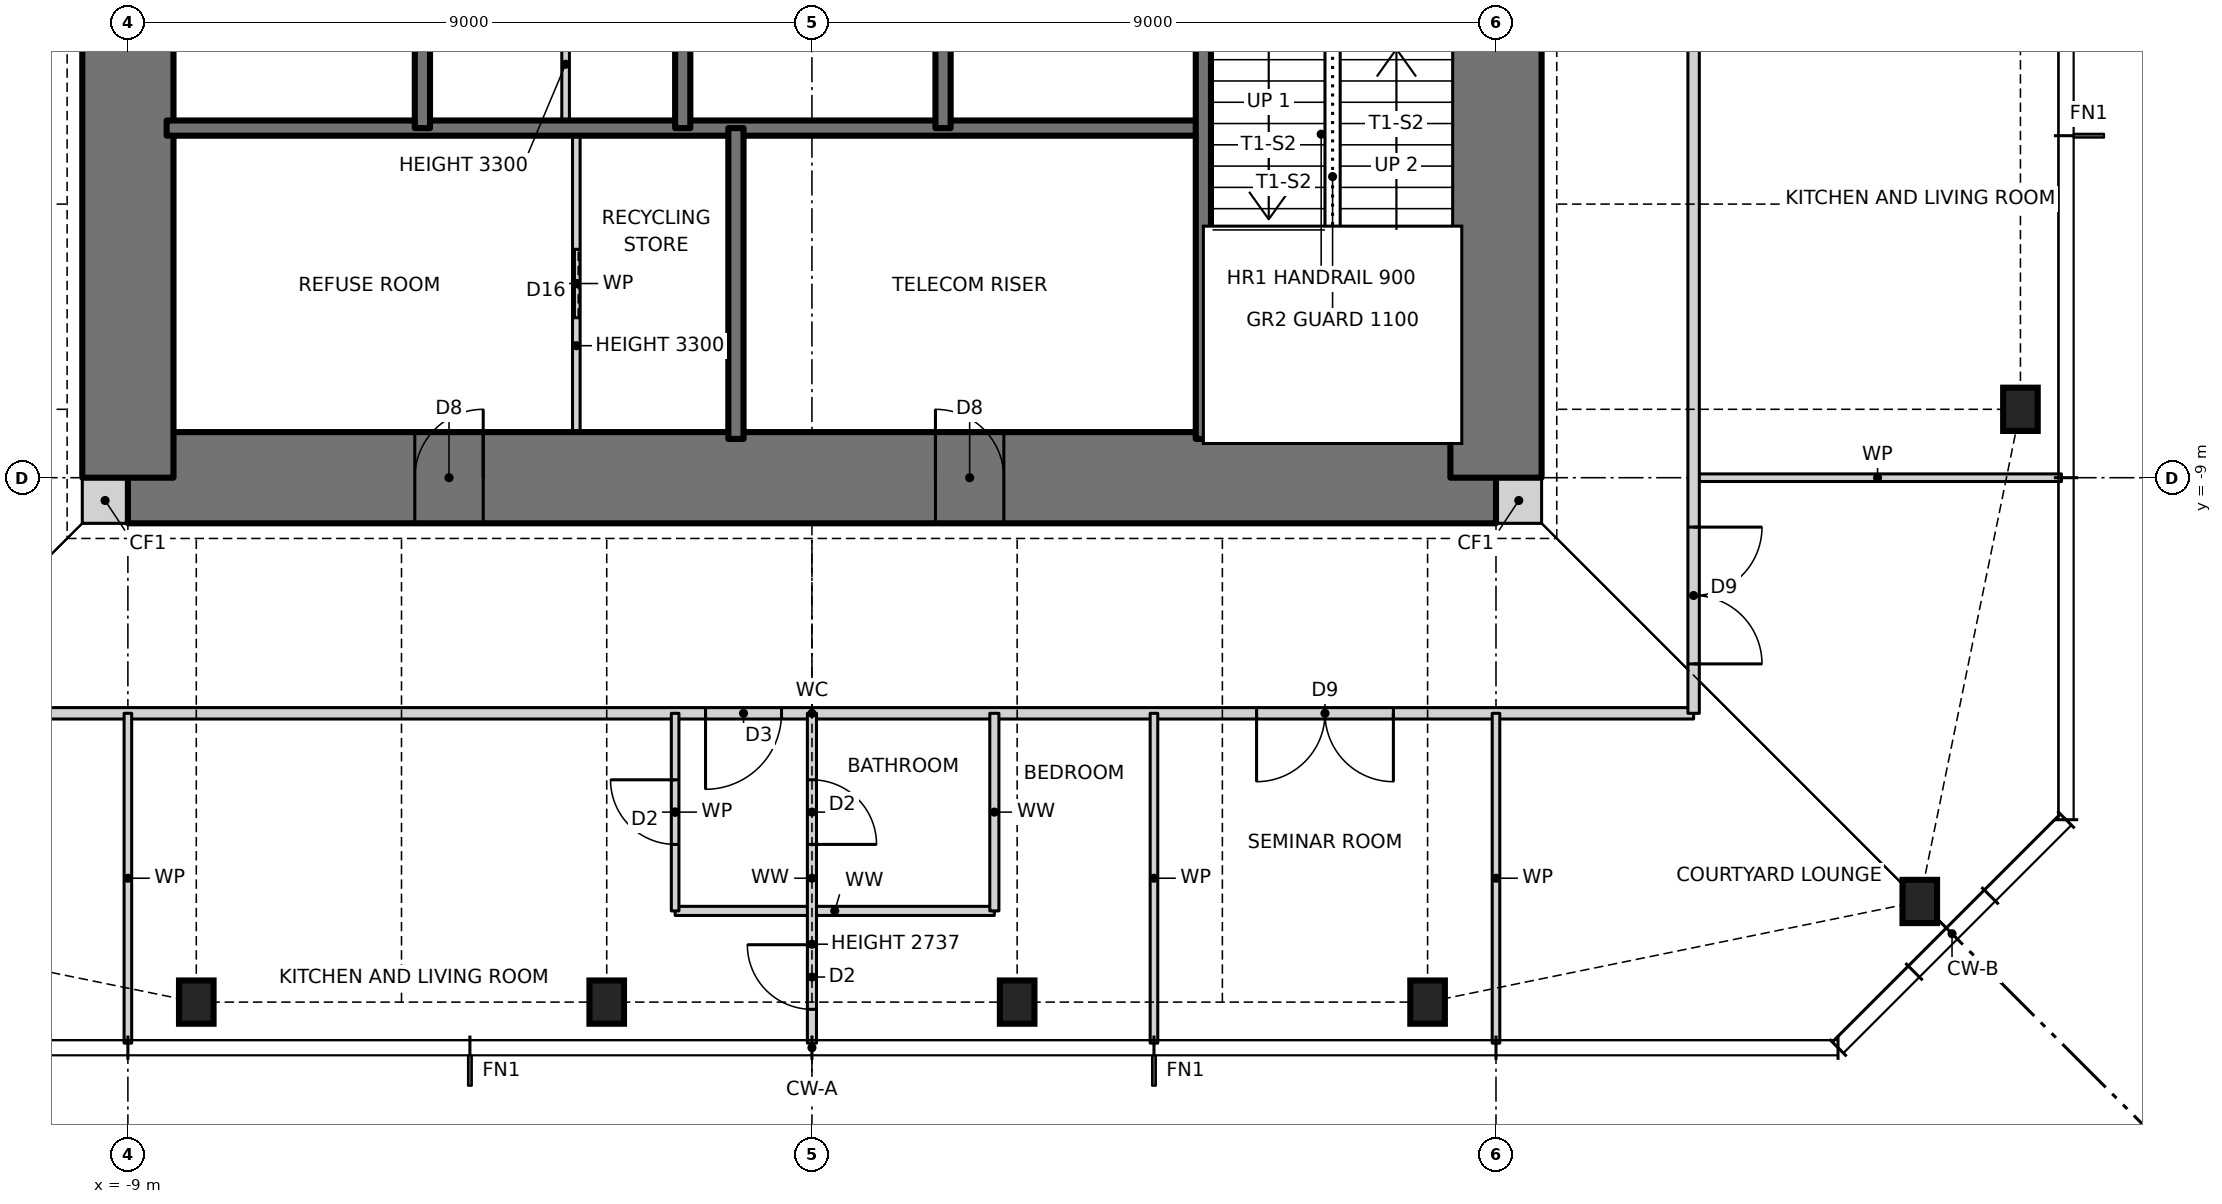
"""IFC4 building model, lengths in metres.
Left out: names, types, materials, properties, quantities, classifications, styles, units other than length and angle.
Written with IfcOpenShell. Run it as: python <this file> out.ifc"""

import sys

from ifc_helpers import new_model, si_unit, direction, frame, frame_2d, origin, origin_2d, place, context, subcontext, project, spatial, rectangle, i_section, extrude, element, fill, save


model = new_model("IFC4")
c1 = context("Model", 3, precision=1e-05, world=origin(), true_north=direction((0.0, 1.0)))
c2 = subcontext(c1, "Body", "Model", "MODEL_VIEW")
j1 = project(units=[si_unit("LENGTHUNIT", "METRE"), si_unit("PLANEANGLEUNIT", "RADIAN")], contexts=[c1])
p1 = place(None, origin())
s1 = spatial("IfcSite", under=j1, at=p1, CompositionType="ELEMENT")
p2 = place(p1, origin())
s2 = spatial("IfcBuilding", under=s1, at=p2, CompositionType="ELEMENT")
p3 = place(p2, frame((0.0, 0.0, 229.0)))
s3 = spatial("IfcBuildingStorey", under=s2, at=p3, CompositionType="ELEMENT", Elevation=229.0)
for number, where, z_axis, x_axis in (
    (1, (-8.1, -15.9, 0.0), (0.0, 0.0, 1.0), (1.0, 0.0, 0.0)),
    (2, (-2.7, -15.9, 0.0), (0.0, 0.0, 1.0), (1.0, 0.0, 0.0)),
    (3, (2.7, -15.9, 0.0), (0.0, 0.0, 1.0), (1.0, 0.0, 0.0)),
    (4, (8.1, -15.9, 0.0), (0.0, 0.0, 1.0), (1.0, 0.0, 0.0)),
    (5, (14.576, -14.576, 0.0), (0.0, 0.0, 1.0), (1.0, 0.0, 0.0)),
    (6, (15.9, -8.1, 0.0), (0.0, 0.0, 1.0), (1.0, 0.0, 0.0)),
):
    element("IfcColumn", number, at=place(p3, frame(where, z_axis=z_axis, x_axis=x_axis)), inside=s3, PredefinedType="COLUMN", context=c2, shape_type="SweptSolid", body=[
        extrude(i_section(OverallWidth=0.455, OverallDepth=0.569, WebThickness=0.078, FlangeThickness=0.125, at=origin_2d()), origin(), (0.0, 0.0, 1.0), 3.5),
    ])
for number, where, z_axis, x_axis in (
    (7, (-9.6, -9.3, 0.0), (0.0, 0.0, 1.0), (1.0, 0.0, 0.0)),
    (8, (9.0, -9.3, 0.0), (0.0, 0.0, 1.0), (1.0, 0.0, 0.0)),
):
    element("IfcWall", number, at=place(p3, frame(where, z_axis=z_axis, x_axis=x_axis)), inside=s3, PredefinedType="SOLIDWALL", context=c2, shape_type="SweptSolid", body=[
        extrude(rectangle(XDim=0.6, YDim=0.6, at=frame_2d((0.3, 0.0))), origin(), (0.0, 0.0, 1.0), 3.5),
    ])
p4 = place(p3, frame((-9.0, -9.0, 0.0), z_axis=(0.0, 0.0, 1.0), x_axis=(1.0, 0.0, 0.0)))
e9 = element("IfcWall", 9, at=p4, inside=s3, PredefinedType="SHEAR", context=c2, shape_type="SweptSolid", body=[
    extrude(rectangle(XDim=18.0, YDim=1.2, at=frame_2d((9.0, 0.0))), origin(), (0.0, 0.0, 1.0), 3.5),
])
p5 = place(p4, frame((3.775, 0.0, 0.0)))
e10 = element("IfcOpeningElement", 10, at=p5, cuts=e9, PredefinedType="OPENING", context=c2, shape_type="SweptSolid", body=[
    extrude(rectangle(XDim=0.9, YDim=2.1, at=frame_2d((0.45, 1.05))), frame((0.0, 0.61, 0.0), z_axis=(0.0, -1.0, 0.0), x_axis=(1.0, 0.0, 0.0)), (0.0, 0.0, 1.0), 1.22),
])
p6 = place(p4, frame((10.625, 0.0, 0.0)))
e11 = element("IfcOpeningElement", 11, at=p6, cuts=e9, PredefinedType="OPENING", context=c2, shape_type="SweptSolid", body=[
    extrude(rectangle(XDim=0.9, YDim=2.1, at=frame_2d((0.45, 1.05))), frame((0.0, 0.61, 0.0), z_axis=(0.0, -1.0, 0.0), x_axis=(1.0, 0.0, 0.0)), (0.0, 0.0, 1.0), 1.22),
])
p7 = place(p3, frame((9.0, -9.0, 0.0), z_axis=(0.0, 0.0, 1.0), x_axis=(0.0, 1.0, 0.0)))
e12 = element("IfcWall", 12, at=p7, inside=s3, PredefinedType="SHEAR", context=c2, shape_type="SweptSolid", body=[
    extrude(rectangle(XDim=18.0, YDim=1.2, at=frame_2d((9.0, 0.0))), origin(), (0.0, 0.0, 1.0), 3.5),
])
p8 = place(p7, frame((8.5, 0.0, 0.0)))
e13 = element("IfcOpeningElement", 13, at=p8, cuts=e12, PredefinedType="OPENING", context=c2, shape_type="SweptSolid", body=[
    extrude(rectangle(XDim=1.0, YDim=2.1, at=frame_2d((0.5, 1.05))), frame((0.0, 0.61, 0.0), z_axis=(0.0, -1.0, 0.0), x_axis=(1.0, 0.0, 0.0)), (0.0, 0.0, 1.0), 1.22),
])
p9 = place(p3, frame((-9.0, 9.0, 0.0), z_axis=(0.0, 0.0, 1.0), x_axis=(0.0, -1.0, 0.0)))
e14 = element("IfcWall", 14, at=p9, inside=s3, PredefinedType="SHEAR", context=c2, shape_type="SweptSolid", body=[
    extrude(rectangle(XDim=18.0, YDim=1.2, at=frame_2d((9.0, 0.0))), origin(), (0.0, 0.0, 1.0), 3.5),
])
p10 = place(p9, frame((8.5, 0.0, 0.0)))
e15 = element("IfcOpeningElement", 15, at=p10, cuts=e14, PredefinedType="OPENING", context=c2, shape_type="SweptSolid", body=[
    extrude(rectangle(XDim=1.0, YDim=2.1, at=frame_2d((0.5, 1.05))), frame((0.0, 0.61, 0.0), z_axis=(0.0, -1.0, 0.0), x_axis=(1.0, 0.0, 0.0)), (0.0, 0.0, 1.0), 1.22),
])
p11 = place(p3, frame((-1.8, -14.7, 0.0), z_axis=(0.0, 0.0, 1.0), x_axis=(1.0, 0.0, 0.0)))
e16 = element("IfcWall", 16, at=p11, inside=s3, PredefinedType="PARTITIONING", context=c2, shape_type="SweptSolid", body=[
    extrude(rectangle(XDim=4.2, YDim=0.12, at=frame_2d((2.1, 0.0))), origin(), (0.0, 0.0, 1.0), 3.27),
])
p12 = place(p3, frame((-11.6, -12.1, 0.0), z_axis=(0.0, 0.0, 1.0), x_axis=(1.0, 0.0, 0.0)))
e17 = element("IfcWall", 17, at=p12, inside=s3, PredefinedType="PARTITIONING", context=c2, shape_type="SweptSolid", body=[
    extrude(rectangle(XDim=23.2, YDim=0.15, at=frame_2d((11.6, 0.0))), origin(), (0.0, 0.0, 1.0), 3.27),
])
p13 = place(p12, frame((10.2, 0.0, 0.0)))
e18 = element("IfcOpeningElement", 18, at=p13, cuts=e17, PredefinedType="OPENING", context=c2, shape_type="SweptSolid", body=[
    extrude(rectangle(XDim=1.0, YDim=2.1, at=frame_2d((0.5, 1.05))), frame((0.0, 0.085, 0.0), z_axis=(0.0, -1.0, 0.0), x_axis=(1.0, 0.0, 0.0)), (0.0, 0.0, 1.0), 0.17),
])
p14 = place(p12, frame((17.45, 0.0, 0.0)))
e19 = element("IfcOpeningElement", 19, at=p14, cuts=e17, PredefinedType="OPENING", context=c2, shape_type="SweptSolid", body=[
    extrude(rectangle(XDim=1.8, YDim=2.1, at=frame_2d((0.9, 1.05))), frame((0.0, 0.085, 0.0), z_axis=(0.0, -1.0, 0.0), x_axis=(1.0, 0.0, 0.0)), (0.0, 0.0, 1.0), 0.17),
])
p15 = place(p3, frame((11.6, -9.0, 0.0), z_axis=(0.0, 0.0, 1.0), x_axis=(1.0, 0.0, 0.0)))
e20 = element("IfcWall", 20, at=p15, inside=s3, PredefinedType="PARTITIONING", context=c2, shape_type="SweptSolid", body=[
    extrude(rectangle(XDim=4.84, YDim=0.1, at=frame_2d((2.42, 0.0))), origin(), (0.0, 0.0, 1.0), 3.27),
])
p16 = place(p3, frame((-8.49, -4.4, 0.0), z_axis=(0.0, 0.0, 1.0), x_axis=(1.0, 0.0, 0.0)))
e21 = element("IfcWall", 21, at=p16, inside=s3, PredefinedType="SOLIDWALL", context=c2, shape_type="SweptSolid", body=[
    extrude(rectangle(XDim=13.64, YDim=0.2, at=frame_2d((6.82, 0.0))), origin(), (0.0, 0.0, 1.0), 3.5),
])
p17 = place(p3, frame((11.6, -12.1, 0.0), z_axis=(0.0, 0.0, 1.0), x_axis=(0.0, 1.0, 0.0)))
e22 = element("IfcWall", 22, at=p17, inside=s3, PredefinedType="PARTITIONING", context=c2, shape_type="SweptSolid", body=[
    extrude(rectangle(XDim=23.7, YDim=0.15, at=frame_2d((11.85, 0.0))), origin(), (0.0, 0.0, 1.0), 3.27),
])
p18 = place(p17, frame((10.7, 0.0, 0.0)))
e23 = element("IfcOpeningElement", 23, at=p18, cuts=e22, PredefinedType="OPENING", context=c2, shape_type="SweptSolid", body=[
    extrude(rectangle(XDim=1.0, YDim=2.1, at=frame_2d((0.5, 1.05))), frame((0.0, 0.085, 0.0), z_axis=(0.0, -1.0, 0.0), x_axis=(1.0, 0.0, 0.0)), (0.0, 0.0, 1.0), 0.17),
])
p19 = place(p17, frame((19.55, 0.0, 0.0)))
e24 = element("IfcOpeningElement", 24, at=p19, cuts=e22, PredefinedType="OPENING", context=c2, shape_type="SweptSolid", body=[
    extrude(rectangle(XDim=1.0, YDim=2.1, at=frame_2d((0.5, 1.05))), frame((0.0, 0.085, 0.0), z_axis=(0.0, -1.0, 0.0), x_axis=(1.0, 0.0, 0.0)), (0.0, 0.0, 1.0), 0.17),
])
p20 = place(p17, frame((21.5, 0.0, 0.0)))
e25 = element("IfcOpeningElement", 25, at=p20, cuts=e22, PredefinedType="OPENING", context=c2, shape_type="SweptSolid", body=[
    extrude(rectangle(XDim=1.8, YDim=2.1, at=frame_2d((0.9, 1.05))), frame((0.0, 0.085, 0.0), z_axis=(0.0, -1.0, 0.0), x_axis=(1.0, 0.0, 0.0)), (0.0, 0.0, 1.0), 0.17),
])
p21 = place(p17, frame((0.65, 0.0, 0.0)))
e26 = element("IfcOpeningElement", 26, at=p21, cuts=e22, PredefinedType="OPENING", context=c2, shape_type="SweptSolid", body=[
    extrude(rectangle(XDim=1.8, YDim=2.1, at=frame_2d((0.9, 1.05))), frame((0.0, 0.085, 0.0), z_axis=(0.0, -1.0, 0.0), x_axis=(1.0, 0.0, 0.0)), (0.0, 0.0, 1.0), 0.17),
])
p22 = place(p3, frame((9.0, -16.44, 0.0), z_axis=(0.0, 0.0, 1.0), x_axis=(0.0, 1.0, 0.0)))
e27 = element("IfcWall", 27, at=p22, inside=s3, PredefinedType="PARTITIONING", context=c2, shape_type="SweptSolid", body=[
    extrude(rectangle(XDim=4.34, YDim=0.1, at=frame_2d((2.17, 0.0))), origin(), (0.0, 0.0, 1.0), 3.27),
])
p23 = place(p3, frame((5.15, -8.49, 0.0), z_axis=(0.0, 0.0, 1.0), x_axis=(0.0, 1.0, 0.0)))
e28 = element("IfcWall", 28, at=p23, inside=s3, PredefinedType="SOLIDWALL", context=c2, shape_type="SweptSolid", body=[
    extrude(rectangle(XDim=13.09, YDim=0.2, at=frame_2d((6.545, 0.0))), origin(), (0.0, 0.0, 1.0), 3.5),
])
p24 = place(p23, frame((7.89, 0.0, 0.0)))
e29 = element("IfcOpeningElement", 29, at=p24, cuts=e28, PredefinedType="OPENING", context=c2, shape_type="SweptSolid", body=[
    extrude(rectangle(XDim=1.2, YDim=2.1, at=frame_2d((0.6, 1.05))), frame((0.0, 0.11, 0.0), z_axis=(0.0, -1.0, 0.0), x_axis=(1.0, 0.0, 0.0)), (0.0, 0.0, 1.0), 0.22),
])
p25 = place(p3, frame((4.5, -16.44, 0.0), z_axis=(0.0, 0.0, 1.0), x_axis=(0.0, 1.0, 0.0)))
e30 = element("IfcWall", 30, at=p25, inside=s3, PredefinedType="PARTITIONING", context=c2, shape_type="SweptSolid", body=[
    extrude(rectangle(XDim=4.34, YDim=0.1, at=frame_2d((2.17, 0.0))), origin(), (0.0, 0.0, 1.0), 3.27),
])
p26 = place(p3, frame((2.4, -14.7, 0.0), z_axis=(0.0, 0.0, 1.0), x_axis=(0.0, 1.0, 0.0)))
e31 = element("IfcWall", 31, at=p26, inside=s3, PredefinedType="PARTITIONING", context=c2, shape_type="SweptSolid", body=[
    extrude(rectangle(XDim=2.6, YDim=0.12, at=frame_2d((1.3, 0.0))), origin(), (0.0, 0.0, 1.0), 3.27),
])
p27 = place(p3, frame((1.725, -4.4, 0.0), z_axis=(0.0, 0.0, 1.0), x_axis=(0.0, 1.0, 0.0)))
e32 = element("IfcWall", 32, at=p27, inside=s3, PredefinedType="SOLIDWALL", context=c2, shape_type="SweptSolid", body=[
    extrude(rectangle(XDim=2.8, YDim=0.2, at=frame_2d((1.4, 0.0))), origin(), (0.0, 0.0, 1.0), 3.5),
])
p28 = place(p3, frame((0.0, -16.44, 0.0), z_axis=(0.0, 0.0, 1.0), x_axis=(0.0, 1.0, 0.0)))
e33 = element("IfcWall", 33, at=p28, inside=s3, PredefinedType="PARTITIONING", context=c2, shape_type="SweptSolid", body=[
    extrude(rectangle(XDim=4.34, YDim=0.12, at=frame_2d((2.17, 0.0))), origin(), (0.0, 0.0, 1.0), 2.737),
])
p29 = place(p28, frame((0.445, 0.0, 0.0)))
e34 = element("IfcOpeningElement", 34, at=p29, cuts=e33, PredefinedType="OPENING", context=c2, shape_type="SweptSolid", body=[
    extrude(rectangle(XDim=0.85, YDim=2.1, at=frame_2d((0.425, 1.05))), frame((0.0, 0.07, 0.0), z_axis=(0.0, -1.0, 0.0), x_axis=(1.0, 0.0, 0.0)), (0.0, 0.0, 1.0), 0.14),
])
p30 = place(p28, frame((2.615, 0.0, 0.0)))
e35 = element("IfcOpeningElement", 35, at=p30, cuts=e33, PredefinedType="OPENING", context=c2, shape_type="SweptSolid", body=[
    extrude(rectangle(XDim=0.85, YDim=2.1, at=frame_2d((0.425, 1.05))), frame((0.0, 0.07, 0.0), z_axis=(0.0, -1.0, 0.0), x_axis=(1.0, 0.0, 0.0)), (0.0, 0.0, 1.0), 0.14),
])
p31 = place(p3, frame((-1.0, -8.49, 0.0), z_axis=(0.0, 0.0, 1.0), x_axis=(0.0, 1.0, 0.0)))
e36 = element("IfcWall", 36, at=p31, inside=s3, PredefinedType="SOLIDWALL", context=c2, shape_type="SweptSolid", body=[
    extrude(rectangle(XDim=4.09, YDim=0.2, at=frame_2d((2.045, 0.0))), origin(), (0.0, 0.0, 1.0), 3.5),
])
p32 = place(p3, frame((-1.7, -4.4, 0.0), z_axis=(0.0, 0.0, 1.0), x_axis=(0.0, 1.0, 0.0)))
e37 = element("IfcWall", 37, at=p32, inside=s3, PredefinedType="SOLIDWALL", context=c2, shape_type="SweptSolid", body=[
    extrude(rectangle(XDim=2.8, YDim=0.2, at=frame_2d((1.4, 0.0))), origin(), (0.0, 0.0, 1.0), 3.5),
])
p33 = place(p3, frame((-1.8, -14.7, 0.0), z_axis=(0.0, 0.0, 1.0), x_axis=(0.0, 1.0, 0.0)))
e38 = element("IfcWall", 38, at=p33, inside=s3, PredefinedType="PARTITIONING", context=c2, shape_type="SweptSolid", body=[
    extrude(rectangle(XDim=2.6, YDim=0.1, at=frame_2d((1.3, 0.0))), origin(), (0.0, 0.0, 1.0), 3.27),
])
p34 = place(p33, frame((0.875, 0.0, 0.0)))
e39 = element("IfcOpeningElement", 39, at=p34, cuts=e38, PredefinedType="OPENING", context=c2, shape_type="SweptSolid", body=[
    extrude(rectangle(XDim=0.85, YDim=2.1, at=frame_2d((0.425, 1.05))), frame((0.0, 0.06, 0.0), z_axis=(0.0, -1.0, 0.0), x_axis=(1.0, 0.0, 0.0)), (0.0, 0.0, 1.0), 0.12),
])
p35 = place(p3, frame((-3.1, -8.49, 0.0), z_axis=(0.0, 0.0, 1.0), x_axis=(0.0, 1.0, 0.0)))
e40 = element("IfcWall", 40, at=p35, inside=s3, PredefinedType="PARTITIONING", context=c2, shape_type="SweptSolid", body=[
    extrude(rectangle(XDim=4.09, YDim=0.1, at=frame_2d((2.045, 0.0))), origin(), (0.0, 0.0, 1.0), 3.3),
])
p36 = place(p35, frame((1.595, 0.0, 0.0)))
e41 = element("IfcOpeningElement", 41, at=p36, cuts=e40, PredefinedType="OPENING", context=c2, shape_type="SweptSolid", body=[
    extrude(rectangle(XDim=0.9, YDim=2.1, at=frame_2d((0.45, 1.05))), frame((0.0, 0.06, 0.0), z_axis=(0.0, -1.0, 0.0), x_axis=(1.0, 0.0, 0.0)), (0.0, 0.0, 1.0), 0.12),
])
p37 = place(p3, frame((-3.241, -4.4, 0.0), z_axis=(0.0, 0.0, 1.0), x_axis=(0.0, 1.0, 0.0)))
e42 = element("IfcWall", 42, at=p37, inside=s3, PredefinedType="PARTITIONING", context=c2, shape_type="SweptSolid", body=[
    extrude(rectangle(XDim=2.8, YDim=0.1, at=frame_2d((1.4, 0.0))), origin(), (0.0, 0.0, 1.0), 3.3),
])
p38 = place(p3, frame((-5.125, -4.4, 0.0), z_axis=(0.0, 0.0, 1.0), x_axis=(0.0, 1.0, 0.0)))
e43 = element("IfcWall", 43, at=p38, inside=s3, PredefinedType="SOLIDWALL", context=c2, shape_type="SweptSolid", body=[
    extrude(rectangle(XDim=2.8, YDim=0.2, at=frame_2d((1.4, 0.0))), origin(), (0.0, 0.0, 1.0), 3.5),
])
p39 = place(p3, frame((-9.0, -16.44, 0.0), z_axis=(0.0, 0.0, 1.0), x_axis=(0.0, 1.0, 0.0)))
e44 = element("IfcWall", 44, at=p39, inside=s3, PredefinedType="PARTITIONING", context=c2, shape_type="SweptSolid", body=[
    extrude(rectangle(XDim=4.34, YDim=0.1, at=frame_2d((2.17, 0.0))), origin(), (0.0, 0.0, 1.0), 3.27),
])
p40 = place(p36, origin())
e45 = element("IfcDoor", 45, at=p40, inside=s3, OperationType="SLIDING_TO_LEFT", PredefinedType="DOOR", context=c2, shape_type="SweptSolid", body=[
    extrude(rectangle(XDim=0.9, YDim=2.1, at=frame_2d((0.45, 1.05))), frame((0.0, 0.025, 0.0), z_axis=(0.0, -1.0, 0.0), x_axis=(1.0, 0.0, 0.0)), (0.0, 0.0, 1.0), 0.05),
])
fill(e41, e45)
p41 = place(p13, frame((1.0, 0.0, 0.0), z_axis=(0.0, 0.0, 1.0), x_axis=(-1.0, 0.0, 0.0)))
e46 = element("IfcDoor", 46, at=p41, inside=s3, OperationType="SINGLE_SWING_RIGHT", PredefinedType="DOOR", context=c2, shape_type="SweptSolid", body=[
    extrude(rectangle(XDim=1.0, YDim=2.1, at=frame_2d((0.5, 1.05))), frame((0.0, 0.025, 0.0), z_axis=(0.0, -1.0, 0.0), x_axis=(1.0, 0.0, 0.0)), (0.0, 0.0, 1.0), 0.05),
])
fill(e18, e46)
p42 = place(p34, origin())
e47 = element("IfcDoor", 47, at=p42, inside=s3, OperationType="SINGLE_SWING_RIGHT", PredefinedType="DOOR", context=c2, shape_type="SweptSolid", body=[
    extrude(rectangle(XDim=0.85, YDim=2.1, at=frame_2d((0.425, 1.05))), frame((0.0, 0.025, 0.0), z_axis=(0.0, -1.0, 0.0), x_axis=(1.0, 0.0, 0.0)), (0.0, 0.0, 1.0), 0.05),
])
fill(e39, e47)
p43 = place(p29, origin())
e48 = element("IfcDoor", 48, at=p43, inside=s3, OperationType="SINGLE_SWING_RIGHT", PredefinedType="DOOR", context=c2, shape_type="SweptSolid", body=[
    extrude(rectangle(XDim=0.85, YDim=2.1, at=frame_2d((0.425, 1.05))), frame((0.0, 0.025, 0.0), z_axis=(0.0, -1.0, 0.0), x_axis=(1.0, 0.0, 0.0)), (0.0, 0.0, 1.0), 0.05),
])
fill(e34, e48)
p44 = place(p30, frame((0.85, 0.0, 0.0), z_axis=(0.0, 0.0, 1.0), x_axis=(-1.0, 0.0, 0.0)))
e49 = element("IfcDoor", 49, at=p44, inside=s3, OperationType="SINGLE_SWING_RIGHT", PredefinedType="DOOR", context=c2, shape_type="SweptSolid", body=[
    extrude(rectangle(XDim=0.85, YDim=2.1, at=frame_2d((0.425, 1.05))), frame((0.0, 0.025, 0.0), z_axis=(0.0, -1.0, 0.0), x_axis=(1.0, 0.0, 0.0)), (0.0, 0.0, 1.0), 0.05),
])
fill(e35, e49)
p45 = place(p14, frame((1.8, 0.0, 0.0), z_axis=(0.0, 0.0, 1.0), x_axis=(-1.0, 0.0, 0.0)))
e50 = element("IfcDoor", 50, at=p45, inside=s3, OperationType="DOUBLE_DOOR_SINGLE_SWING", PredefinedType="DOOR", context=c2, shape_type="SweptSolid", body=[
    extrude(rectangle(XDim=1.8, YDim=2.1, at=frame_2d((0.9, 1.05))), frame((0.0, 0.025, 0.0), z_axis=(0.0, -1.0, 0.0), x_axis=(1.0, 0.0, 0.0)), (0.0, 0.0, 1.0), 0.05),
])
fill(e19, e50)
p46 = place(p21, frame((1.8, 0.0, 0.0), z_axis=(0.0, 0.0, 1.0), x_axis=(-1.0, 0.0, 0.0)))
e51 = element("IfcDoor", 51, at=p46, inside=s3, OperationType="DOUBLE_DOOR_SINGLE_SWING", PredefinedType="DOOR", context=c2, shape_type="SweptSolid", body=[
    extrude(rectangle(XDim=1.8, YDim=2.1, at=frame_2d((0.9, 1.05))), frame((0.0, 0.025, 0.0), z_axis=(0.0, -1.0, 0.0), x_axis=(1.0, 0.0, 0.0)), (0.0, 0.0, 1.0), 0.05),
])
fill(e26, e51)
p47 = place(p5, origin())
e52 = element("IfcDoor", 52, at=p47, inside=s3, OperationType="SINGLE_SWING_RIGHT", PredefinedType="DOOR", context=c2, shape_type="SweptSolid", body=[
    extrude(rectangle(XDim=0.9, YDim=2.1, at=frame_2d((0.45, 1.05))), frame((0.0, 0.025, 0.0), z_axis=(0.0, -1.0, 0.0), x_axis=(1.0, 0.0, 0.0)), (0.0, 0.0, 1.0), 0.05),
])
fill(e10, e52)
p48 = place(p6, origin())
e53 = element("IfcDoor", 53, at=p48, inside=s3, OperationType="SINGLE_SWING_LEFT", PredefinedType="DOOR", context=c2, shape_type="SweptSolid", body=[
    extrude(rectangle(XDim=0.9, YDim=2.1, at=frame_2d((0.45, 1.05))), frame((0.0, 0.025, 0.0), z_axis=(0.0, -1.0, 0.0), x_axis=(1.0, 0.0, 0.0)), (0.0, 0.0, 1.0), 0.05),
])
fill(e11, e53)
save(model, sys.argv[1])
